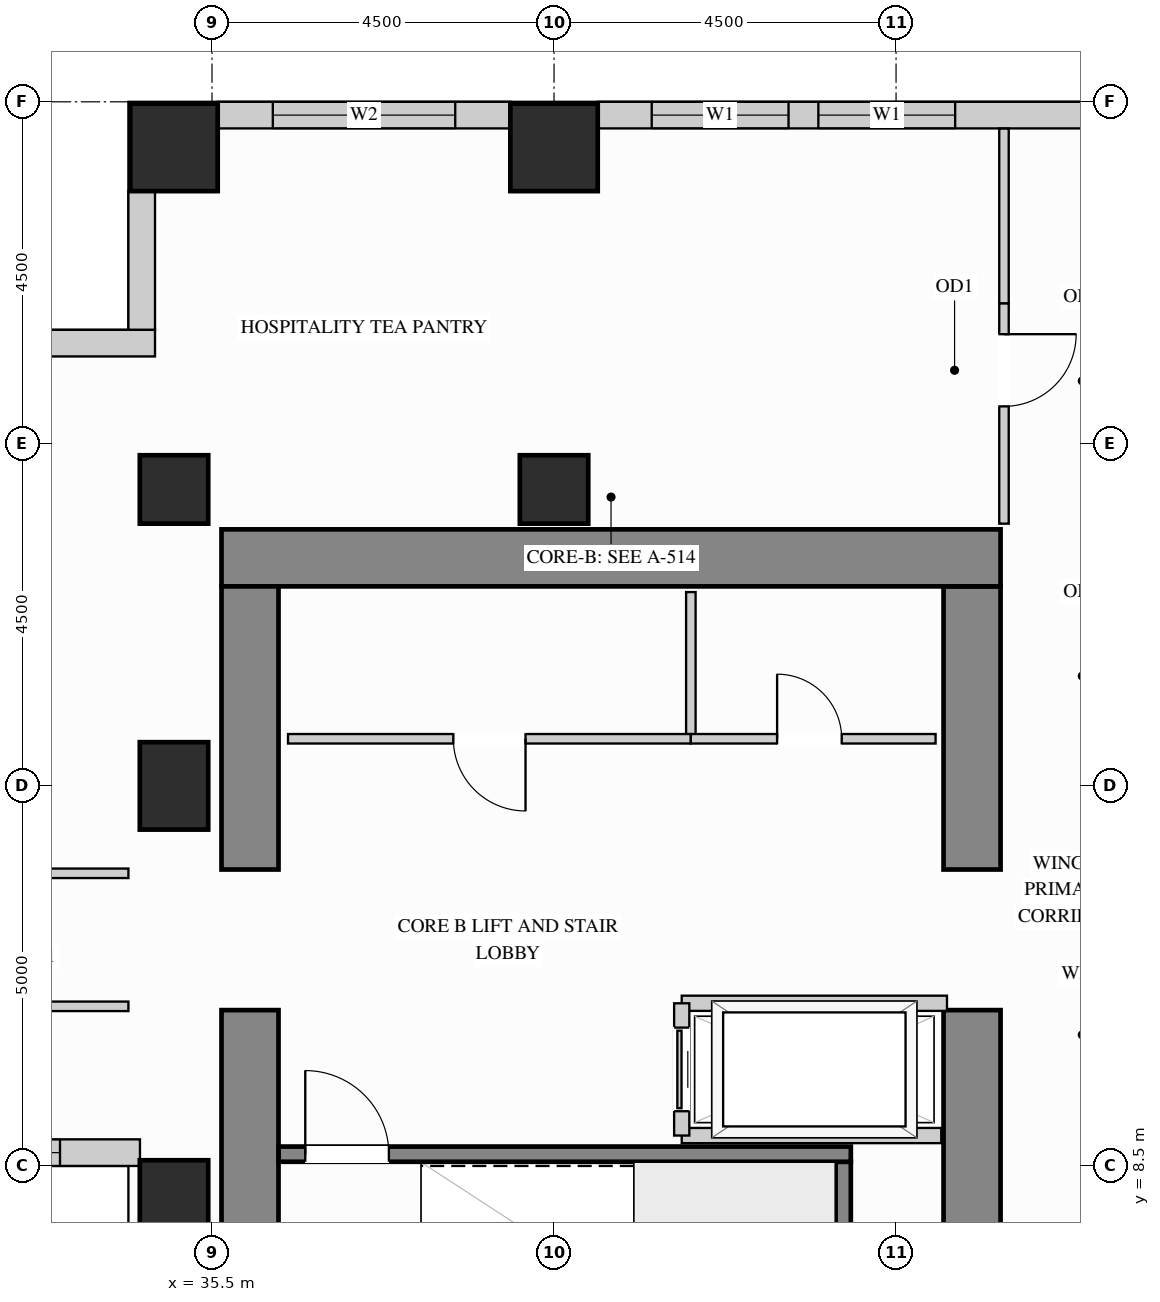
"""IFC4 building model, lengths in metres.
Left out: names, types, materials, properties, quantities, classifications, styles, units other than length and angle.
Written with IfcOpenShell. Run it as: python <this file> out.ifc"""

import sys

from ifc_helpers import new_model, si_unit, direction, frame, frame_2d, origin, origin_2d, place, context, subcontext, project, spatial, rectangle, extrude, source, transform, mapped, element, fill, save


model = new_model("IFC4")
c1 = context("Model", 3, precision=1e-05, world=origin(), true_north=direction((0.0, 1.0)))
c2 = subcontext(c1, "Body", "Model", "MODEL_VIEW")
j1 = project(units=[si_unit("LENGTHUNIT", "METRE"), si_unit("PLANEANGLEUNIT", "RADIAN")], contexts=[c1])
p1 = place(None, origin())
s1 = spatial("IfcSite", under=j1, at=p1, CompositionType="ELEMENT")
p2 = place(p1, origin())
s2 = spatial("IfcBuilding", under=s1, at=p2, CompositionType="ELEMENT")
p3 = place(p2, frame((0.0, 0.0, 99.0)))
s3 = spatial("IfcBuildingStorey", under=s2, at=p3, CompositionType="ELEMENT", Elevation=99.0)
m1 = source(origin(), c2, "Body", "SweptSolid", [
    extrude(rectangle(XDim=0.9, YDim=0.9, at=origin_2d()), origin(), (0.0, 0.0, 1.0), 3.38),
])
for number, where, z_axis, x_axis in (
    (1, (35.0, 17.4, 0.0), (0.0, 0.0, 1.0), (1.0, 0.0, 0.0)),
    (2, (40.0, 17.4, 0.0), (0.0, 0.0, 1.0), (1.0, 0.0, 0.0)),
):
    element("IfcColumn", number, at=place(p3, frame(where, z_axis=z_axis, x_axis=x_axis)), inside=s3, PredefinedType="COLUMN", context=c2, shape_type="MappedRepresentation", body=[
        mapped(m1, transform((0.0, 0.0, 0.0), x_axis=(1.0, 0.0, 0.0), y_axis=(0.0, 1.0, 0.0), z_axis=(0.0, 0.0, 1.0))),
    ])
m2 = source(origin(), c2, "Body", "SweptSolid", [
    extrude(rectangle(XDim=0.9, YDim=1.15, at=origin_2d()), origin(), (0.0, 0.0, 1.0), 3.38),
])
for number, where, z_axis, x_axis in (
    (3, (35.0, 13.5, 0.0), (0.0, 0.0, 1.0), (1.0, 0.0, 0.0)),
    (4, (35.0, 8.0, 0.0), (0.0, 0.0, 1.0), (1.0, 0.0, 0.0)),
):
    element("IfcColumn", number, at=place(p3, frame(where, z_axis=z_axis, x_axis=x_axis)), inside=s3, PredefinedType="COLUMN", context=c2, shape_type="MappedRepresentation", body=[
        mapped(m2, transform((0.0, 0.0, 0.0), x_axis=(1.0, 0.0, 0.0), y_axis=(0.0, 1.0, 0.0), z_axis=(0.0, 0.0, 1.0))),
    ])
m3 = source(origin(), c2, "Body", "SweptSolid", [
    extrude(rectangle(XDim=1.15, YDim=1.15, at=origin_2d()), origin(), (0.0, 0.0, 1.0), 3.38),
])
for number, where, z_axis, x_axis in (
    (5, (35.0, 21.9, 0.0), (0.0, 0.0, 1.0), (1.0, 0.0, 0.0)),
    (6, (40.0, 21.9, 0.0), (0.0, 0.0, 1.0), (1.0, 0.0, 0.0)),
):
    element("IfcColumn", number, at=place(p3, frame(where, z_axis=z_axis, x_axis=x_axis)), inside=s3, PredefinedType="COLUMN", context=c2, shape_type="MappedRepresentation", body=[
        mapped(m3, transform((0.0, 0.0, 0.0), x_axis=(1.0, 0.0, 0.0), y_axis=(0.0, 1.0, 0.0), z_axis=(0.0, 0.0, 1.0))),
    ])
m4 = source(origin(), c2, "Body", "SweptSolid", [
    extrude(rectangle(XDim=5.675, YDim=0.75, at=frame_2d((2.837, 0.0))), origin(), (0.0, 0.0, 1.0), 3.38),
])
p4 = place(p3, frame((45.5, 4.875, 0.0), z_axis=(0.0, 0.0, 1.0), x_axis=(0.0, 1.0, 0.0)))
e7 = element("IfcWall", 7, at=p4, inside=s3, PredefinedType="SHEAR", context=c2, shape_type="MappedRepresentation", body=[
    mapped(m4, transform((0.0, 0.0, 0.0), x_axis=(1.0, 0.0, 0.0), y_axis=(0.0, 1.0, 0.0), z_axis=(0.0, 0.0, 1.0))),
])
m5 = source(origin(), c2, "Body", "SweptSolid", [
    extrude(rectangle(XDim=3.725, YDim=0.75, at=frame_2d((1.863, 0.0))), origin(), (0.0, 0.0, 1.0), 3.38),
])
p5 = place(p3, frame((45.5, 12.4, 0.0), z_axis=(0.0, 0.0, 1.0), x_axis=(0.0, 1.0, 0.0)))
e8 = element("IfcWall", 8, at=p5, inside=s3, PredefinedType="SHEAR", context=c2, shape_type="MappedRepresentation", body=[
    mapped(m5, transform((0.0, 0.0, 0.0), x_axis=(1.0, 0.0, 0.0), y_axis=(0.0, 1.0, 0.0), z_axis=(0.0, 0.0, 1.0))),
])
m6 = source(origin(), c2, "Body", "SweptSolid", [
    extrude(rectangle(XDim=10.25, YDim=0.75, at=frame_2d((5.125, 0.0))), origin(), (0.0, 0.0, 1.0), 3.38),
])
p6 = place(p3, frame((35.625, 16.5, 0.0), z_axis=(0.0, 0.0, 1.0), x_axis=(1.0, 0.0, 0.0)))
e9 = element("IfcWall", 9, at=p6, inside=s3, PredefinedType="SHEAR", context=c2, shape_type="MappedRepresentation", body=[
    mapped(m6, transform((0.0, 0.0, 0.0), x_axis=(1.0, 0.0, 0.0), y_axis=(0.0, 1.0, 0.0), z_axis=(0.0, 0.0, 1.0))),
])
p7 = place(p3, frame((36.0, 4.875, 0.0), z_axis=(0.0, 0.0, 1.0), x_axis=(0.0, 1.0, 0.0)))
e10 = element("IfcWall", 10, at=p7, inside=s3, PredefinedType="SHEAR", context=c2, shape_type="MappedRepresentation", body=[
    mapped(m4, transform((0.0, 0.0, 0.0), x_axis=(1.0, 0.0, 0.0), y_axis=(0.0, 1.0, 0.0), z_axis=(0.0, 0.0, 1.0))),
])
p8 = place(p3, frame((36.0, 12.4, 0.0), z_axis=(0.0, 0.0, 1.0), x_axis=(0.0, 1.0, 0.0)))
e11 = element("IfcWall", 11, at=p8, inside=s3, PredefinedType="SHEAR", context=c2, shape_type="MappedRepresentation", body=[
    mapped(m5, transform((0.0, 0.0, 0.0), x_axis=(1.0, 0.0, 0.0), y_axis=(0.0, 1.0, 0.0), z_axis=(0.0, 0.0, 1.0))),
])
p9 = place(p3, frame((30.948, 8.675, 0.0), z_axis=(0.0, 0.0, 1.0), x_axis=(1.0, 0.0, 0.0)))
e12 = element("IfcWall", 12, at=p9, inside=s3, PredefinedType="SOLIDWALL", context=c2, shape_type="SweptSolid", body=[
    extrude(rectangle(XDim=3.604, YDim=0.35, at=frame_2d((1.802, 0.0))), origin(), (0.0, 0.0, 1.0), 3.365),
])
p10 = place(p9, frame((1.052, 0.0, 0.78)))
e13 = element("IfcOpeningElement", 13, at=p10, cuts=e12, PredefinedType="OPENING", context=c2, shape_type="SweptSolid", body=[
    extrude(rectangle(XDim=1.5, YDim=2.0, at=frame_2d((0.75, 1.0))), frame((0.0, 0.185, 0.0), z_axis=(0.0, -1.0, 0.0), x_axis=(1.0, 0.0, 0.0)), (0.0, 0.0, 1.0), 0.37),
])
p11 = place(p3, frame((47.027, 22.325, 0.0), z_axis=(0.0, 0.0, 1.0), x_axis=(-1.0, 0.0, 0.0)))
e14 = element("IfcWall", 14, at=p11, inside=s3, PredefinedType="SOLIDWALL", context=c2, shape_type="SweptSolid", body=[
    extrude(rectangle(XDim=6.454, YDim=0.35, at=frame_2d((3.227, 0.0))), origin(), (0.0, 0.0, 1.0), 3.365),
])
p12 = place(p11, frame((1.749, 0.0, 0.78)))
e15 = element("IfcOpeningElement", 15, at=p12, cuts=e14, PredefinedType="OPENING", context=c2, shape_type="SweptSolid", body=[
    extrude(rectangle(XDim=1.8, YDim=2.1, at=frame_2d((0.9, 1.05))), frame((0.0, 0.185, 0.0), z_axis=(0.0, -1.0, 0.0), x_axis=(1.0, 0.0, 0.0)), (0.0, 0.0, 1.0), 0.37),
])
p13 = place(p11, frame((3.942, 0.0, 0.78)))
e16 = element("IfcOpeningElement", 16, at=p13, cuts=e14, PredefinedType="OPENING", context=c2, shape_type="SweptSolid", body=[
    extrude(rectangle(XDim=1.8, YDim=2.1, at=frame_2d((0.9, 1.05))), frame((0.0, 0.185, 0.0), z_axis=(0.0, -1.0, 0.0), x_axis=(1.0, 0.0, 0.0)), (0.0, 0.0, 1.0), 0.37),
])
p14 = place(p3, frame((39.427, 22.325, 0.0), z_axis=(0.0, 0.0, 1.0), x_axis=(-1.0, 0.0, 0.0)))
e17 = element("IfcWall", 17, at=p14, inside=s3, PredefinedType="SOLIDWALL", context=c2, shape_type="SweptSolid", body=[
    extrude(rectangle(XDim=3.854, YDim=0.35, at=frame_2d((1.927, 0.0))), origin(), (0.0, 0.0, 1.0), 3.365),
])
p15 = place(p14, frame((0.727, 0.0, 0.78)))
e18 = element("IfcOpeningElement", 18, at=p15, cuts=e17, PredefinedType="OPENING", context=c2, shape_type="SweptSolid", body=[
    extrude(rectangle(XDim=2.4, YDim=2.1, at=frame_2d((1.2, 1.05))), frame((0.0, 0.185, 0.0), z_axis=(0.0, -1.0, 0.0), x_axis=(1.0, 0.0, 0.0)), (0.0, 0.0, 1.0), 0.37),
])
m7 = source(origin(), c2, "Body", "SweptSolid", [
    extrude(rectangle(XDim=1.829, YDim=0.35, at=frame_2d((0.915, 0.0))), origin(), (0.0, 0.0, 1.0), 3.365),
])
p16 = place(p3, frame((34.575, 21.327, 0.0), z_axis=(0.0, 0.0, 1.0), x_axis=(0.0, -1.0, 0.0)))
e19 = element("IfcWall", 19, at=p16, inside=s3, PredefinedType="SOLIDWALL", context=c2, shape_type="MappedRepresentation", body=[
    mapped(m7, transform((0.0, 0.0, 0.0), x_axis=(1.0, 0.0, 0.0), y_axis=(0.0, 1.0, 0.0), z_axis=(0.0, 0.0, 1.0))),
])
p17 = place(p3, frame((34.75, 19.325, 0.0), z_axis=(0.0, 0.0, 1.0), x_axis=(-1.0, 0.0, 0.0)))
e20 = element("IfcWall", 20, at=p17, inside=s3, PredefinedType="SOLIDWALL", context=c2, shape_type="SweptSolid", body=[
    extrude(rectangle(XDim=15.6, YDim=0.35, at=frame_2d((7.8, 0.0))), origin(), (0.0, 0.0, 1.0), 3.365),
])
p18 = place(p17, frame((4.307, 0.0, 0.78)))
e21 = element("IfcOpeningElement", 21, at=p18, cuts=e20, PredefinedType="OPENING", context=c2, shape_type="SweptSolid", body=[
    extrude(rectangle(XDim=1.5, YDim=2.0, at=frame_2d((0.75, 1.0))), frame((0.0, 0.185, 0.0), z_axis=(0.0, -1.0, 0.0), x_axis=(1.0, 0.0, 0.0)), (0.0, 0.0, 1.0), 0.37),
])
p19 = place(p17, frame((9.793, 0.0, 0.78)))
e22 = element("IfcOpeningElement", 22, at=p19, cuts=e20, PredefinedType="OPENING", context=c2, shape_type="SweptSolid", body=[
    extrude(rectangle(XDim=1.5, YDim=2.0, at=frame_2d((0.75, 1.0))), frame((0.0, 0.185, 0.0), z_axis=(0.0, -1.0, 0.0), x_axis=(1.0, 0.0, 0.0)), (0.0, 0.0, 1.0), 0.37),
])
m8 = source(origin(), c2, "Body", "SweptSolid", [
    extrude(rectangle(XDim=1.93, YDim=0.125, at=frame_2d((0.965, 0.0))), origin(), (0.0, 0.0, 1.0), 3.365),
])
p20 = place(p3, frame((41.8, 14.12, 0.0), z_axis=(0.0, 0.0, 1.0), x_axis=(0.0, 1.0, 0.0)))
e23 = element("IfcWall", 23, at=p20, inside=s3, PredefinedType="PARTITIONING", context=c2, shape_type="MappedRepresentation", body=[
    mapped(m8, transform((0.0, 0.0, 0.0), x_axis=(1.0, 0.0, 0.0), y_axis=(0.0, 1.0, 0.0), z_axis=(0.0, 0.0, 1.0))),
])
p21 = place(p3, frame((36.5, 14.12, 0.0), z_axis=(0.0, 0.0, 1.0), x_axis=(1.0, 0.0, 0.0)))
e24 = element("IfcWall", 24, at=p21, inside=s3, PredefinedType="PARTITIONING", context=c2, shape_type="SweptSolid", body=[
    extrude(rectangle(XDim=5.3, YDim=0.125, at=frame_2d((2.65, 0.0))), origin(), (0.0, 0.0, 1.0), 3.365),
])
p22 = place(p21, frame((2.175, 0.0, 0.0)))
e25 = element("IfcOpeningElement", 25, at=p22, cuts=e24, PredefinedType="OPENING", context=c2, shape_type="SweptSolid", body=[
    extrude(rectangle(XDim=0.95, YDim=2.15, at=frame_2d((0.475, 1.075))), frame((0.0, 0.073, 0.0), z_axis=(0.0, -1.0, 0.0), x_axis=(1.0, 0.0, 0.0)), (0.0, 0.0, 1.0), 0.145),
])
p23 = place(p3, frame((41.8, 14.12, 0.0), z_axis=(0.0, 0.0, 1.0), x_axis=(1.0, 0.0, 0.0)))
e26 = element("IfcWall", 26, at=p23, inside=s3, PredefinedType="PARTITIONING", context=c2, shape_type="SweptSolid", body=[
    extrude(rectangle(XDim=3.22, YDim=0.125, at=frame_2d((1.61, 0.0))), origin(), (0.0, 0.0, 1.0), 3.365),
])
p24 = place(p23, frame((1.135, 0.0, 0.0)))
e27 = element("IfcOpeningElement", 27, at=p24, cuts=e26, PredefinedType="OPENING", context=c2, shape_type="SweptSolid", body=[
    extrude(rectangle(XDim=0.85, YDim=2.1, at=frame_2d((0.425, 1.05))), frame((0.0, 0.073, 0.0), z_axis=(0.0, -1.0, 0.0), x_axis=(1.0, 0.0, 0.0)), (0.0, 0.0, 1.0), 0.145),
])
p25 = place(p3, frame((45.92, 16.95, 0.0), z_axis=(0.0, 0.0, 1.0), x_axis=(0.0, 1.0, 0.0)))
e28 = element("IfcWall", 28, at=p25, inside=s3, PredefinedType="PARTITIONING", context=c2, shape_type="SweptSolid", body=[
    extrude(rectangle(XDim=2.9, YDim=0.125, at=frame_2d((1.45, 0.0))), origin(), (0.0, 0.0, 1.0), 3.365),
])
p26 = place(p25, frame((1.543, 0.0, 0.0)))
e29 = element("IfcOpeningElement", 29, at=p26, cuts=e28, PredefinedType="OPENING", context=c2, shape_type="SweptSolid", body=[
    extrude(rectangle(XDim=0.95, YDim=2.15, at=frame_2d((0.475, 1.075))), frame((0.0, 0.073, 0.0), z_axis=(0.0, -1.0, 0.0), x_axis=(1.0, 0.0, 0.0)), (0.0, 0.0, 1.0), 0.145),
])
m9 = source(origin(), c2, "Body", "SweptSolid", [
    extrude(rectangle(XDim=2.298, YDim=0.125, at=frame_2d((1.149, 0.0))), origin(), (0.0, 0.0, 1.0), 3.365),
])
p27 = place(p3, frame((45.92, 19.85, 0.0), z_axis=(0.0, 0.0, 1.0), x_axis=(0.0, 1.0, 0.0)))
e30 = element("IfcWall", 30, at=p27, inside=s3, PredefinedType="PARTITIONING", context=c2, shape_type="MappedRepresentation", body=[
    mapped(m9, transform((0.0, 0.0, 0.0), x_axis=(1.0, 0.0, 0.0), y_axis=(0.0, 1.0, 0.0), z_axis=(0.0, 0.0, 1.0))),
])
p28 = place(p3, frame((29.85, 12.35, 0.0), z_axis=(0.0, 0.0, 1.0), x_axis=(1.0, 0.0, 0.0)))
e31 = element("IfcWall", 31, at=p28, inside=s3, PredefinedType="PARTITIONING", context=c2, shape_type="SweptSolid", body=[
    extrude(rectangle(XDim=4.55, YDim=0.125, at=frame_2d((2.275, 0.0))), origin(), (0.0, 0.0, 1.0), 3.365),
])
p29 = place(p28, frame((1.8, 0.0, 0.0)))
e32 = element("IfcOpeningElement", 32, at=p29, cuts=e31, PredefinedType="OPENING", context=c2, shape_type="SweptSolid", body=[
    extrude(rectangle(XDim=0.95, YDim=2.15, at=frame_2d((0.475, 1.075))), frame((0.0, 0.073, 0.0), z_axis=(0.0, -1.0, 0.0), x_axis=(1.0, 0.0, 0.0)), (0.0, 0.0, 1.0), 0.145),
])
p30 = place(p3, frame((26.95, 10.6, 0.0), z_axis=(0.0, 0.0, 1.0), x_axis=(1.0, 0.0, 0.0)))
e33 = element("IfcWall", 33, at=p30, inside=s3, PredefinedType="PARTITIONING", context=c2, shape_type="SweptSolid", body=[
    extrude(rectangle(XDim=7.45, YDim=0.125, at=frame_2d((3.725, 0.0))), origin(), (0.0, 0.0, 1.0), 3.365),
])
p31 = place(p30, frame((4.683, 0.0, 0.0)))
e34 = element("IfcOpeningElement", 34, at=p31, cuts=e33, PredefinedType="OPENING", context=c2, shape_type="SweptSolid", body=[
    extrude(rectangle(XDim=0.95, YDim=2.15, at=frame_2d((0.475, 1.075))), frame((0.0, 0.073, 0.0), z_axis=(0.0, -1.0, 0.0), x_axis=(1.0, 0.0, 0.0)), (0.0, 0.0, 1.0), 0.145),
])
m10 = source(origin(), c2, "Body", "SweptSolid", [
    extrude(rectangle(XDim=3.49, YDim=0.2, at=frame_2d((1.745, 0.0))), origin(), (0.0, 0.0, 1.0), 3.365),
])
p32 = place(p3, frame((41.68, 10.64, 0.0), z_axis=(0.0, 0.0, 1.0), x_axis=(1.0, 0.0, 0.0)))
e35 = element("IfcWall", 35, at=p32, inside=s3, PredefinedType="PARTITIONING", context=c2, shape_type="MappedRepresentation", body=[
    mapped(m10, transform((0.0, 0.0, 0.0), x_axis=(1.0, 0.0, 0.0), y_axis=(0.0, 1.0, 0.0), z_axis=(0.0, 0.0, 1.0))),
])
m11 = source(origin(), c2, "Body", "SweptSolid", [
    extrude(rectangle(XDim=3.415, YDim=0.2, at=frame_2d((1.708, 0.0))), origin(), (0.0, 0.0, 1.0), 3.365),
])
p33 = place(p3, frame((41.68, 8.9, 0.0), z_axis=(0.0, 0.0, 1.0), x_axis=(1.0, 0.0, 0.0)))
e36 = element("IfcWall", 36, at=p33, inside=s3, PredefinedType="PARTITIONING", context=c2, shape_type="MappedRepresentation", body=[
    mapped(m11, transform((0.0, 0.0, 0.0), x_axis=(1.0, 0.0, 0.0), y_axis=(0.0, 1.0, 0.0), z_axis=(0.0, 0.0, 1.0))),
])
p34 = place(p3, frame((41.68, 8.9, 0.0), z_axis=(0.0, 0.0, 1.0), x_axis=(0.0, 1.0, 0.0)))
e37 = element("IfcWall", 37, at=p34, inside=s3, PredefinedType="PARTITIONING", context=c2, shape_type="SweptSolid", body=[
    extrude(rectangle(XDim=1.74, YDim=0.2, at=frame_2d((0.87, 0.0))), origin(), (0.0, 0.0, 1.0), 3.365),
])
p35 = place(p34, frame((0.32, 0.0, 0.0)))
e38 = element("IfcOpeningElement", 38, at=p35, cuts=e37, PredefinedType="OPENING", context=c2, shape_type="SweptSolid", body=[
    extrude(rectangle(XDim=1.1, YDim=2.2, at=frame_2d((0.55, 1.1))), frame((0.0, 0.11, 0.0), z_axis=(0.0, -1.0, 0.0), x_axis=(1.0, 0.0, 0.0)), (0.0, 0.0, 1.0), 0.22),
])
m12 = source(origin(), c2, "Body", "SweptSolid", [
    extrude(rectangle(XDim=3.678, YDim=0.2, at=frame_2d((1.839, 0.0))), origin(), (0.0, 0.0, 1.0), 3.38),
])
p36 = place(p3, frame((43.805, 4.877, 0.0), z_axis=(0.0, 0.0, 1.0), x_axis=(0.0, 1.0, 0.0)))
e39 = element("IfcWall", 39, at=p36, inside=s3, PredefinedType="SHEAR", context=c2, shape_type="MappedRepresentation", body=[
    mapped(m12, transform((0.0, 0.0, 0.0), x_axis=(1.0, 0.0, 0.0), y_axis=(0.0, 1.0, 0.0), z_axis=(0.0, 0.0, 1.0))),
])
p37 = place(p3, frame((36.377, 8.655, 0.0), z_axis=(0.0, 0.0, 1.0), x_axis=(1.0, 0.0, 0.0)))
e40 = element("IfcWall", 40, at=p37, inside=s3, PredefinedType="SHEAR", context=c2, shape_type="SweptSolid", body=[
    extrude(rectangle(XDim=7.528, YDim=0.2, at=frame_2d((3.764, 0.0))), origin(), (0.0, 0.0, 1.0), 3.38),
])
p38 = place(p37, frame((0.35, 0.0, 0.0)))
e41 = element("IfcOpeningElement", 41, at=p38, cuts=e40, PredefinedType="OPENING", context=c2, shape_type="SweptSolid", body=[
    extrude(rectangle(XDim=1.1, YDim=2.15, at=frame_2d((0.55, 1.075))), frame((0.0, 0.11, 0.0), z_axis=(0.0, -1.0, 0.0), x_axis=(1.0, 0.0, 0.0)), (0.0, 0.0, 1.0), 0.22),
])
m13 = source(origin(), c2, "Body", "SweptSolid", [
    extrude(rectangle(XDim=1.1, YDim=2.2, at=frame_2d((0.55, 1.1))), frame((0.0, 0.025, 0.0), z_axis=(0.0, -1.0, 0.0), x_axis=(1.0, 0.0, 0.0)), (0.0, 0.0, 1.0), 0.05),
])
p39 = place(p35, origin())
e42 = element("IfcDoor", 42, at=p39, inside=s3, OperationType="SLIDING_TO_LEFT", PredefinedType="DOOR", context=c2, shape_type="MappedRepresentation", body=[
    mapped(m13, transform((0.0, 0.0, 0.0), x_axis=(1.0, 0.0, 0.0), y_axis=(0.0, 1.0, 0.0), z_axis=(0.0, 0.0, 1.0))),
])
fill(e38, e42)
m14 = source(origin(), c2, "Body", "SweptSolid", [
    extrude(rectangle(XDim=0.95, YDim=2.15, at=frame_2d((0.475, 1.075))), frame((0.0, 0.025, 0.0), z_axis=(0.0, -1.0, 0.0), x_axis=(1.0, 0.0, 0.0)), (0.0, 0.0, 1.0), 0.05),
])
p40 = place(p22, origin())
e43 = element("IfcDoor", 43, at=p40, inside=s3, OperationType="SINGLE_SWING_RIGHT", PredefinedType="DOOR", context=c2, shape_type="MappedRepresentation", body=[
    mapped(m14, transform((0.0, 0.0, 0.0), x_axis=(1.0, 0.0, 0.0), y_axis=(0.0, 1.0, 0.0), z_axis=(0.0, 0.0, 1.0))),
])
fill(e25, e43)
p41 = place(p26, origin())
e44 = element("IfcDoor", 44, at=p41, inside=s3, OperationType="SINGLE_SWING_RIGHT", PredefinedType="DOOR", context=c2, shape_type="MappedRepresentation", body=[
    mapped(m14, transform((0.0, 0.0, 0.0), x_axis=(1.0, 0.0, 0.0), y_axis=(0.0, 1.0, 0.0), z_axis=(0.0, 0.0, 1.0))),
])
fill(e29, e44)
m15 = source(origin(), c2, "Body", "SweptSolid", [
    extrude(rectangle(XDim=0.85, YDim=2.1, at=frame_2d((0.425, 1.05))), frame((0.0, 0.025, 0.0), z_axis=(0.0, -1.0, 0.0), x_axis=(1.0, 0.0, 0.0)), (0.0, 0.0, 1.0), 0.05),
])
p42 = place(p24, origin())
e45 = element("IfcDoor", 45, at=p42, inside=s3, OperationType="SINGLE_SWING_LEFT", PredefinedType="DOOR", context=c2, shape_type="MappedRepresentation", body=[
    mapped(m15, transform((0.0, 0.0, 0.0), x_axis=(1.0, 0.0, 0.0), y_axis=(0.0, 1.0, 0.0), z_axis=(0.0, 0.0, 1.0))),
])
fill(e27, e45)
m16 = source(origin(), c2, "Body", "SweptSolid", [
    extrude(rectangle(XDim=1.1, YDim=2.15, at=frame_2d((0.55, 1.075))), frame((0.0, 0.025, 0.0), z_axis=(0.0, -1.0, 0.0), x_axis=(1.0, 0.0, 0.0)), (0.0, 0.0, 1.0), 0.05),
])
p43 = place(p38, origin())
e46 = element("IfcDoor", 46, at=p43, inside=s3, OperationType="SINGLE_SWING_LEFT", PredefinedType="DOOR", context=c2, shape_type="MappedRepresentation", body=[
    mapped(m16, transform((0.0, 0.0, 0.0), x_axis=(1.0, 0.0, 0.0), y_axis=(0.0, 1.0, 0.0), z_axis=(0.0, 0.0, 1.0))),
])
fill(e41, e46)
m17 = source(origin(), c2, "Body", "SweptSolid", [
    extrude(rectangle(XDim=1.8, YDim=2.1, at=frame_2d((0.9, 1.05))), frame((0.0, 0.03, 0.0), z_axis=(0.0, -1.0, 0.0), x_axis=(1.0, 0.0, 0.0)), (0.0, 0.0, 1.0), 0.06),
])
p44 = place(p12, origin())
e47 = element("IfcWindow", 47, at=p44, inside=s3, PartitioningType="SINGLE_PANEL", PredefinedType="WINDOW", context=c2, shape_type="MappedRepresentation", body=[
    mapped(m17, transform((0.0, 0.0, 0.0), x_axis=(1.0, 0.0, 0.0), y_axis=(0.0, 1.0, 0.0), z_axis=(0.0, 0.0, 1.0))),
])
fill(e15, e47)
p45 = place(p13, origin())
e48 = element("IfcWindow", 48, at=p45, inside=s3, PartitioningType="SINGLE_PANEL", PredefinedType="WINDOW", context=c2, shape_type="MappedRepresentation", body=[
    mapped(m17, transform((0.0, 0.0, 0.0), x_axis=(1.0, 0.0, 0.0), y_axis=(0.0, 1.0, 0.0), z_axis=(0.0, 0.0, 1.0))),
])
fill(e16, e48)
m18 = source(origin(), c2, "Body", "SweptSolid", [
    extrude(rectangle(XDim=2.4, YDim=2.1, at=frame_2d((1.2, 1.05))), frame((0.0, 0.03, 0.0), z_axis=(0.0, -1.0, 0.0), x_axis=(1.0, 0.0, 0.0)), (0.0, 0.0, 1.0), 0.06),
])
p46 = place(p15, origin())
e49 = element("IfcWindow", 49, at=p46, inside=s3, PartitioningType="SINGLE_PANEL", PredefinedType="WINDOW", context=c2, shape_type="MappedRepresentation", body=[
    mapped(m18, transform((0.0, 0.0, 0.0), x_axis=(1.0, 0.0, 0.0), y_axis=(0.0, 1.0, 0.0), z_axis=(0.0, 0.0, 1.0))),
])
fill(e18, e49)
m19 = source(origin(), c2, "Body", "SweptSolid", [
    extrude(rectangle(XDim=1.5, YDim=2.0, at=frame_2d((0.75, 1.0))), frame((0.0, 0.03, 0.0), z_axis=(0.0, -1.0, 0.0), x_axis=(1.0, 0.0, 0.0)), (0.0, 0.0, 1.0), 0.06),
])
p47 = place(p10, origin())
e50 = element("IfcWindow", 50, at=p47, inside=s3, PartitioningType="SINGLE_PANEL", PredefinedType="WINDOW", context=c2, shape_type="MappedRepresentation", body=[
    mapped(m19, transform((0.0, 0.0, 0.0), x_axis=(1.0, 0.0, 0.0), y_axis=(0.0, 1.0, 0.0), z_axis=(0.0, 0.0, 1.0))),
])
fill(e13, e50)
save(model, sys.argv[1])
